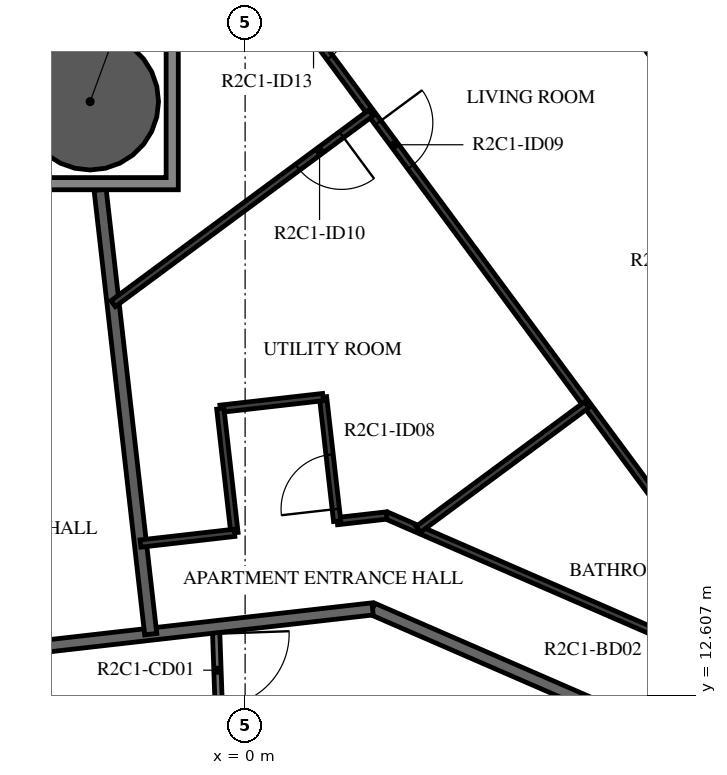
"""IFC4 building model, lengths in metres.
Left out: names, types, materials, properties, quantities, classifications, styles, units other than length and angle.
Written with IfcOpenShell. Run it as: python <this file> out.ifc"""

import sys

from ifc_helpers import new_model, si_unit, direction, frame, frame_2d, origin, origin_2d, place, context, subcontext, project, spatial, polyline, rectangle, hollow_circle, outline, extrude, element, fill, save


model = new_model("IFC4")
c1 = context("Model", 3, precision=1e-05, world=origin(), true_north=direction((0.0, 1.0)))
c2 = subcontext(c1, "Body", "Model", "MODEL_VIEW")
j1 = project(units=[si_unit("LENGTHUNIT", "METRE"), si_unit("PLANEANGLEUNIT", "RADIAN")], contexts=[c1])
p1 = place(None, origin())
s1 = spatial("IfcSite", under=j1, at=p1, CompositionType="ELEMENT")
p2 = place(p1, origin())
s2 = spatial("IfcBuilding", under=s1, at=p2, CompositionType="ELEMENT")
p3 = place(p2, frame((0.0, 0.0, 101.2)))
s3 = spatial("IfcBuildingStorey", under=s2, at=p3, CompositionType="ELEMENT", Elevation=101.2)
p4 = place(p3, frame((-2.549, 22.37, -0.38), z_axis=(0.0, 0.0, 1.0), x_axis=(1.0, 0.0, 0.0)))
e1 = element("IfcColumn", 1, at=p4, inside=s3, PredefinedType="COLUMN", context=c2, shape_type="SweptSolid", body=[
    extrude(hollow_circle(Radius=1.125, WallThickness=0.055, at=origin_2d()), origin(), (0.0, 0.0, 1.0), 3.5),
])
p5 = place(p3, frame((7.423, 22.209, 0.0), z_axis=(0.0, 0.0, 1.0), x_axis=(-0.594811452818, 0.803865247163, 0.0)))
e2 = element("IfcWall", 2, at=p5, inside=s3, PredefinedType="STANDARD", context=c2, shape_type="SweptSolid", body=[
    extrude(rectangle(XDim=3.2, YDim=0.16, at=frame_2d((1.6, 0.0))), origin(), (0.0, 0.0, 1.0), 3.12),
])
p6 = place(p5, frame((0.4, 0.0, 0.0)))
e3 = element("IfcOpeningElement", 3, at=p6, cuts=e2, PredefinedType="OPENING", context=c2, shape_type="SweptSolid", body=[
    extrude(rectangle(XDim=2.4, YDim=2.4, at=frame_2d((1.2, 1.2))), frame((0.0, 0.09, 0.0), z_axis=(0.0, -1.0, 0.0), x_axis=(1.0, 0.0, 0.0)), (0.0, 0.0, 1.0), 0.18),
])
p7 = place(p3, frame((-0.479, 13.734, 0.0), z_axis=(0.0, 0.0, 1.0), x_axis=(0.034805430832, -0.999394107439, 0.0)))
e4 = element("IfcWall", 4, at=p7, inside=s3, PredefinedType="PARTITIONING", context=c2, shape_type="SweptSolid", body=[
    extrude(rectangle(XDim=1.838, YDim=0.12, at=frame_2d((0.919, 0.0))), origin(), (0.0, 0.0, 1.0), 3.12),
])
p8 = place(p7, frame((0.115, 0.0, 0.0)))
e5 = element("IfcOpeningElement", 5, at=p8, cuts=e4, PredefinedType="OPENING", context=c2, shape_type="SweptSolid", body=[
    extrude(rectangle(XDim=1.2, YDim=2.1, at=frame_2d((0.6, 1.05))), frame((0.0, 0.07, 0.0), z_axis=(0.0, -1.0, 0.0), x_axis=(1.0, 0.0, 0.0)), (0.0, 0.0, 1.0), 0.14),
])
p9 = place(p3, frame((8.736, 11.141, 0.0), z_axis=(0.0, 0.0, 1.0), x_axis=(-0.917051290697, 0.398769269416, 0.0)))
e6 = element("IfcWall", 6, at=p9, inside=s3, PredefinedType="STANDARD", context=c2, shape_type="SweptSolid", body=[
    extrude(rectangle(XDim=7.24, YDim=0.2, at=frame_2d((3.62, 0.0))), origin(), (0.0, 0.0, 1.0), 3.12),
])
p10 = place(p9, frame((0.2, 0.0, 0.0)))
e7 = element("IfcOpeningElement", 7, at=p10, cuts=e6, PredefinedType="OPENING", context=c2, shape_type="SweptSolid", body=[
    extrude(rectangle(XDim=1.0, YDim=2.1, at=frame_2d((0.5, 1.05))), frame((0.0, 0.11, 0.0), z_axis=(0.0, -1.0, 0.0), x_axis=(1.0, 0.0, 0.0)), (0.0, 0.0, 1.0), 0.22),
])
p11 = place(p3, frame((2.096, 14.028, 0.0), z_axis=(0.0, 0.0, 1.0), x_axis=(-0.993569170114, -0.113226782163, 0.0)))
e8 = element("IfcWall", 8, at=p11, inside=s3, PredefinedType="STANDARD", context=c2, shape_type="SweptSolid", body=[
    extrude(rectangle(XDim=7.342, YDim=0.2, at=frame_2d((3.671, 0.0))), origin(), (0.0, 0.0, 1.0), 3.12),
])
p12 = place(p3, frame((-2.385, 20.92, 0.0), z_axis=(0.0, 0.0, 1.0), x_axis=(0.113177776247, -0.993574753586, 0.0)))
e9 = element("IfcWall", 9, at=p12, inside=s3, PredefinedType="STANDARD", context=c2, shape_type="SweptSolid", body=[
    extrude(rectangle(XDim=7.356, YDim=0.2, at=frame_2d((3.678, 0.0))), origin(), (0.0, 0.0, 1.0), 3.12),
])
p13 = place(p3, frame((9.796, 12.315, 0.0), z_axis=(0.0, 0.0, 1.0), x_axis=(-0.917059572812, 0.398750222463, 0.0)))
e10 = element("IfcWall", 10, at=p13, inside=s3, PredefinedType="PARTITIONING", context=c2, shape_type="SweptSolid", body=[
    extrude(rectangle(XDim=8.146, YDim=0.12, at=frame_2d((4.073, 0.0))), origin(), (0.0, 0.0, 1.0), 3.12),
])
p14 = place(p13, frame((2.185, 0.0, 0.0)))
e11 = element("IfcOpeningElement", 11, at=p14, cuts=e10, PredefinedType="OPENING", context=c2, shape_type="SweptSolid", body=[
    extrude(rectangle(XDim=0.8, YDim=2.1, at=frame_2d((0.4, 1.05))), frame((0.0, 0.07, 0.0), z_axis=(0.0, -1.0, 0.0), x_axis=(1.0, 0.0, 0.0)), (0.0, 0.0, 1.0), 0.14),
])
p15 = place(p3, frame((2.326, 15.563, 0.0), z_axis=(0.0, 0.0, 1.0), x_axis=(-0.993570169982, -0.113218007944, 0.0)))
e12 = element("IfcWall", 12, at=p15, inside=s3, PredefinedType="PARTITIONING", context=c2, shape_type="SweptSolid", body=[
    extrude(rectangle(XDim=0.817, YDim=0.12, at=frame_2d((0.409, 0.0))), origin(), (0.0, 0.0, 1.0), 3.12),
])
p16 = place(p3, frame((1.514, 15.471, 0.0), z_axis=(0.0, 0.0, 1.0), x_axis=(-0.113301814952, 0.993560616535, 0.0)))
e13 = element("IfcWall", 13, at=p16, inside=s3, PredefinedType="PARTITIONING", context=c2, shape_type="SweptSolid", body=[
    extrude(rectangle(XDim=2.053, YDim=0.12, at=frame_2d((1.027, 0.0))), origin(), (0.0, 0.0, 1.0), 3.12),
])
p17 = place(p16, frame((0.2, 0.0, 0.0)))
e14 = element("IfcOpeningElement", 14, at=p17, cuts=e13, PredefinedType="OPENING", context=c2, shape_type="SweptSolid", body=[
    extrude(rectangle(XDim=0.9, YDim=2.1, at=frame_2d((0.45, 1.05))), frame((0.0, 0.07, 0.0), z_axis=(0.0, -1.0, 0.0), x_axis=(1.0, 0.0, 0.0)), (0.0, 0.0, 1.0), 0.14),
])
p18 = place(p3, frame((1.281, 17.511, 0.0), z_axis=(0.0, 0.0, 1.0), x_axis=(-0.993575191649, -0.113173930474, 0.0)))
e15 = element("IfcWall", 15, at=p18, inside=s3, PredefinedType="PARTITIONING", context=c2, shape_type="SweptSolid", body=[
    extrude(rectangle(XDim=1.7, YDim=0.12, at=frame_2d((0.85, 0.0))), origin(), (0.0, 0.0, 1.0), 3.12),
])
p19 = place(p3, frame((-0.408, 17.319, 0.0), z_axis=(0.0, 0.0, 1.0), x_axis=(0.113184449176, -0.993573993452, 0.0)))
e16 = element("IfcWall", 16, at=p19, inside=s3, PredefinedType="PARTITIONING", context=c2, shape_type="SweptSolid", body=[
    extrude(rectangle(XDim=2.053, YDim=0.12, at=frame_2d((1.027, 0.0))), origin(), (0.0, 0.0, 1.0), 3.12),
])
p20 = place(p3, frame((-0.175, 15.278, 0.0), z_axis=(0.0, 0.0, 1.0), x_axis=(-0.993575604955, -0.113170301923, 0.0)))
e17 = element("IfcWall", 17, at=p20, inside=s3, PredefinedType="PARTITIONING", context=c2, shape_type="SweptSolid", body=[
    extrude(rectangle(XDim=1.555, YDim=0.12, at=frame_2d((0.778, 0.0))), origin(), (0.0, 0.0, 1.0), 3.12),
])
p21 = place(p3, frame((0.498, 24.306, 0.0), z_axis=(0.0, 0.0, 1.0), x_axis=(0.594826122019, -0.803854392639, 0.0)))
e18 = element("IfcWall", 18, at=p21, inside=s3, PredefinedType="PARTITIONING", context=c2, shape_type="SweptSolid", body=[
    extrude(rectangle(XDim=14.576, YDim=0.12, at=frame_2d((7.288, 0.0))), origin(), (0.0, 0.0, 1.0), 3.12),
])
p22 = place(p21, frame((2.841, 0.0, 0.0)))
e19 = element("IfcOpeningElement", 19, at=p22, cuts=e18, PredefinedType="OPENING", context=c2, shape_type="SweptSolid", body=[
    extrude(rectangle(XDim=0.9, YDim=2.1, at=frame_2d((0.45, 1.05))), frame((0.0, 0.07, 0.0), z_axis=(0.0, -1.0, 0.0), x_axis=(1.0, 0.0, 0.0)), (0.0, 0.0, 1.0), 0.14),
])
p23 = place(p21, frame((0.605, 0.0, 0.0)))
e20 = element("IfcOpeningElement", 20, at=p23, cuts=e18, PredefinedType="OPENING", context=c2, shape_type="SweptSolid", body=[
    extrude(rectangle(XDim=0.9, YDim=2.1, at=frame_2d((0.45, 1.05))), frame((0.0, 0.07, 0.0), z_axis=(0.0, -1.0, 0.0), x_axis=(1.0, 0.0, 0.0)), (0.0, 0.0, 1.0), 0.14),
])
p24 = place(p3, frame((5.618, 17.386, 0.0), z_axis=(0.0, 0.0, 1.0), x_axis=(-0.803852063114, -0.59482927015, 0.0)))
e21 = element("IfcWall", 21, at=p24, inside=s3, PredefinedType="PARTITIONING", context=c2, shape_type="SweptSolid", body=[
    extrude(rectangle(XDim=3.446, YDim=0.12, at=frame_2d((1.723, 0.0))), origin(), (0.0, 0.0, 1.0), 3.12),
])
p25 = place(p3, frame((2.068, 22.183, 0.0), z_axis=(0.0, 0.0, 1.0), x_axis=(-0.803867138365, -0.594808896921, 0.0)))
e22 = element("IfcWall", 22, at=p25, inside=s3, PredefinedType="PARTITIONING", context=c2, shape_type="SweptSolid", body=[
    extrude(rectangle(XDim=5.273, YDim=0.12, at=frame_2d((2.636, 0.0))), origin(), (0.0, 0.0, 1.0), 3.12),
])
p26 = place(p25, frame((0.6, 0.0, 0.0)))
e23 = element("IfcOpeningElement", 23, at=p26, cuts=e22, PredefinedType="OPENING", context=c2, shape_type="SweptSolid", body=[
    extrude(rectangle(XDim=0.9, YDim=2.1, at=frame_2d((0.45, 1.05))), frame((0.0, 0.07, 0.0), z_axis=(0.0, -1.0, 0.0), x_axis=(1.0, 0.0, 0.0)), (0.0, 0.0, 1.0), 0.14),
])
p27 = place(p3, origin())
e24 = element("IfcWall", 24, at=p27, inside=s3, PredefinedType="STANDARD", context=c2, shape_type="SweptSolid", body=[
    extrude(outline(polyline([(-1.099, 23.82), (-1.099, 20.92), (-3.999, 20.92), (-3.999, 23.82), (-1.099, 23.82)]), holes=[polyline([(-3.799, 21.12), (-1.299, 21.12), (-1.299, 23.62), (-3.799, 23.62), (-3.799, 21.12)])]), origin(), (0.0, 0.0, 1.0), 3.12),
])
p28 = place(p6, origin())
e25 = element("IfcDoor", 25, at=p28, inside=s3, OperationType="DOUBLE_DOOR_SLIDING", PredefinedType="DOOR", context=c2, shape_type="SweptSolid", body=[
    extrude(rectangle(XDim=2.4, YDim=2.4, at=frame_2d((1.2, 1.2))), frame((0.0, 0.025, 0.0), z_axis=(0.0, -1.0, 0.0), x_axis=(1.0, 0.0, 0.0)), (0.0, 0.0, 1.0), 0.05),
])
fill(e3, e25)
p29 = place(p17, origin())
e26 = element("IfcDoor", 26, at=p29, inside=s3, OperationType="SINGLE_SWING_RIGHT", PredefinedType="DOOR", context=c2, shape_type="SweptSolid", body=[
    extrude(rectangle(XDim=0.9, YDim=2.1, at=frame_2d((0.45, 1.05))), frame((0.0, 0.025, 0.0), z_axis=(0.0, -1.0, 0.0), x_axis=(1.0, 0.0, 0.0)), (0.0, 0.0, 1.0), 0.05),
])
fill(e14, e26)
p30 = place(p22, origin())
e27 = element("IfcDoor", 27, at=p30, inside=s3, OperationType="SINGLE_SWING_RIGHT", PredefinedType="DOOR", context=c2, shape_type="SweptSolid", body=[
    extrude(rectangle(XDim=0.9, YDim=2.1, at=frame_2d((0.45, 1.05))), frame((0.0, 0.025, 0.0), z_axis=(0.0, -1.0, 0.0), x_axis=(1.0, 0.0, 0.0)), (0.0, 0.0, 1.0), 0.05),
])
fill(e19, e27)
p31 = place(p26, origin())
e28 = element("IfcDoor", 28, at=p31, inside=s3, OperationType="SINGLE_SWING_RIGHT", PredefinedType="DOOR", context=c2, shape_type="SweptSolid", body=[
    extrude(rectangle(XDim=0.9, YDim=2.1, at=frame_2d((0.45, 1.05))), frame((0.0, 0.025, 0.0), z_axis=(0.0, -1.0, 0.0), x_axis=(1.0, 0.0, 0.0)), (0.0, 0.0, 1.0), 0.05),
])
fill(e23, e28)
p32 = place(p23, origin())
e29 = element("IfcDoor", 29, at=p32, inside=s3, OperationType="SINGLE_SWING_LEFT", PredefinedType="DOOR", context=c2, shape_type="SweptSolid", body=[
    extrude(rectangle(XDim=0.9, YDim=2.1, at=frame_2d((0.45, 1.05))), frame((0.0, 0.025, 0.0), z_axis=(0.0, -1.0, 0.0), x_axis=(1.0, 0.0, 0.0)), (0.0, 0.0, 1.0), 0.05),
])
fill(e20, e29)
p33 = place(p8, origin())
e30 = element("IfcDoor", 30, at=p33, inside=s3, OperationType="DOUBLE_DOOR_SINGLE_SWING", PredefinedType="DOOR", context=c2, shape_type="SweptSolid", body=[
    extrude(rectangle(XDim=1.2, YDim=2.1, at=frame_2d((0.6, 1.05))), frame((0.0, 0.025, 0.0), z_axis=(0.0, -1.0, 0.0), x_axis=(1.0, 0.0, 0.0)), (0.0, 0.0, 1.0), 0.05),
])
fill(e5, e30)
save(model, sys.argv[1])
